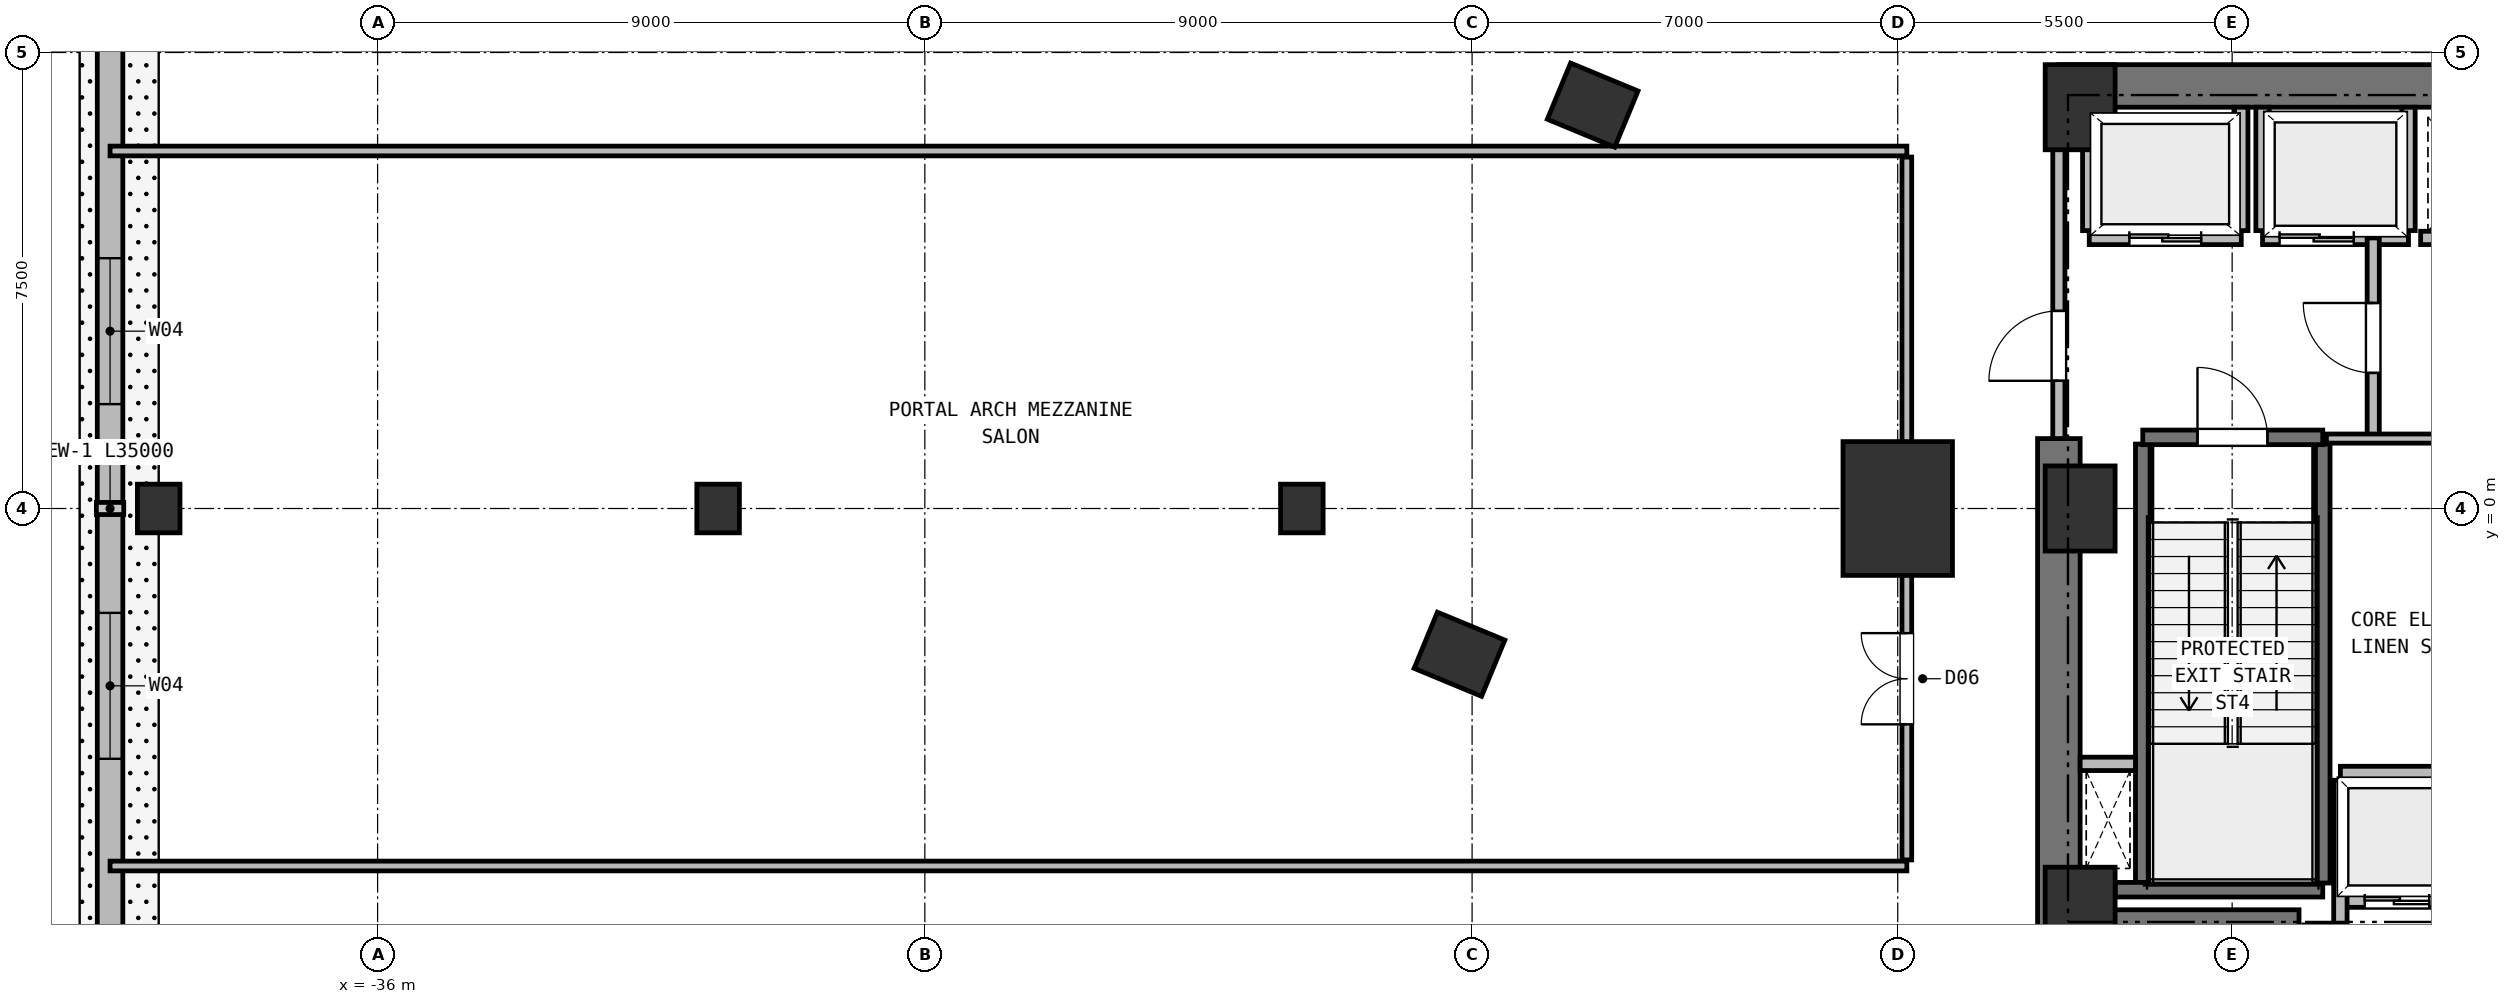
"""IFC4 building model, lengths in metres.
Left out: names, types, materials, properties, quantities, classifications, styles, units other than length and angle.
Written with IfcOpenShell. Run it as: python <this file> out.ifc"""

import sys

from ifc_helpers import new_model, si_unit, direction, frame, frame_2d, origin, origin_2d, place, context, subcontext, project, spatial, rectangle, extrude, element, fill, save


model = new_model("IFC4")
c1 = context("Model", 3, precision=1e-05, world=origin(), true_north=direction((0.0, 1.0)))
c2 = subcontext(c1, "Body", "Model", "MODEL_VIEW")
j1 = project(units=[si_unit("LENGTHUNIT", "METRE"), si_unit("PLANEANGLEUNIT", "RADIAN")], contexts=[c1])
p1 = place(None, origin())
s1 = spatial("IfcSite", under=j1, at=p1, CompositionType="ELEMENT")
p2 = place(p1, origin())
s2 = spatial("IfcBuilding", under=s1, at=p2, CompositionType="ELEMENT")
p3 = place(p2, frame((0.0, 0.0, 6.0)))
s3 = spatial("IfcBuildingStorey", under=s2, at=p3, CompositionType="ELEMENT", Elevation=6.0)
for number, where, z_axis, x_axis in (
    (1, (-8.0, -6.6, 0.0), (0.0, 0.0, 1.0), (1.0, 0.0, 0.0)),
    (2, (-8.0, 6.6, 0.0), (0.0, 0.0, 1.0), (1.0, 0.0, 0.0)),
    (3, (-8.0, 0.0, 0.0), (0.0, 0.0, 1.0), (1.0, 0.0, 0.0)),
):
    element("IfcColumn", number, at=place(p3, frame(where, z_axis=z_axis, x_axis=x_axis)), inside=s3, PredefinedType="COLUMN", context=c2, shape_type="SweptSolid", body=[
        extrude(rectangle(XDim=1.15, YDim=1.4, at=origin_2d()), origin(), (0.0, 0.0, 1.0), 5.0),
    ])
p4 = place(p3, frame((-8.35, 6.95, 0.0), z_axis=(0.0, 0.0, 1.0), x_axis=(1.0, 0.0, 0.0)))
e4 = element("IfcWall", 4, at=p4, inside=s3, PredefinedType="SHEAR", context=c2, shape_type="SweptSolid", body=[
    extrude(rectangle(XDim=16.7, YDim=0.7, at=frame_2d((8.35, 0.0))), origin(), (0.0, 0.0, 1.0), 4.72),
])
p5 = place(p3, frame((-8.35, -6.95, 0.0), z_axis=(0.0, 0.0, 1.0), x_axis=(1.0, 0.0, 0.0)))
e5 = element("IfcWall", 5, at=p5, inside=s3, PredefinedType="SHEAR", context=c2, shape_type="SweptSolid", body=[
    extrude(rectangle(XDim=3.95, YDim=0.7, at=frame_2d((1.975, 0.0))), origin(), (0.0, 0.0, 1.0), 4.72),
])
p6 = place(p3, frame((-8.35, -6.95, 0.0), z_axis=(0.0, 0.0, 1.0), x_axis=(0.0, 1.0, 0.0)))
e6 = element("IfcWall", 6, at=p6, inside=s3, PredefinedType="SHEAR", context=c2, shape_type="SweptSolid", body=[
    extrude(rectangle(XDim=8.1, YDim=0.7, at=frame_2d((4.05, 0.0))), origin(), (0.0, 0.0, 1.0), 4.72),
])
for number, where, z_axis, x_axis in (
    (7, (-16.017, 6.635, 0.0), (0.0, 0.0, 1.0), (0.383, 0.924, 0.0)),
    (8, (-18.207, -2.397, 0.0), (0.0, 0.0, 1.0), (0.383, 0.924, 0.0)),
):
    element("IfcColumn", number, at=place(p3, frame(where, z_axis=z_axis, x_axis=x_axis)), inside=s3, PredefinedType="COLUMN", context=c2, shape_type="SweptSolid", body=[
        extrude(rectangle(XDim=1.0, YDim=1.2, at=origin_2d()), origin(), (0.0, 0.0, 1.0), 5.0),
    ])
for number, where, z_axis, x_axis in (
    (9, (-39.6, 0.0, 0.0), (0.0, 0.0, 1.0), (1.0, 0.0, 0.0)),
    (10, (-30.4, 0.0, 0.0), (0.0, 0.0, 1.0), (1.0, 0.0, 0.0)),
    (11, (-20.8, 0.0, 0.0), (0.0, 0.0, 1.0), (1.0, 0.0, 0.0)),
):
    element("IfcColumn", number, at=place(p3, frame(where, z_axis=z_axis, x_axis=x_axis)), inside=s3, PredefinedType="COLUMN", context=c2, shape_type="SweptSolid", body=[
        extrude(rectangle(XDim=0.7, YDim=0.8, at=origin_2d()), origin(), (0.0, 0.0, 1.0), 5.0),
    ])
p7 = place(p3, frame((-11.0, 0.0, 0.0), z_axis=(0.0, 0.0, 1.0), x_axis=(1.0, 0.0, 0.0)))
e12 = element("IfcColumn", 12, at=p7, inside=s3, PredefinedType="COLUMN", context=c2, shape_type="SweptSolid", body=[
    extrude(rectangle(XDim=1.8, YDim=2.2, at=origin_2d()), origin(), (0.0, 0.0, 1.0), 5.0),
])
p8 = place(p3, frame((-40.4, -17.5, 0.0), z_axis=(0.0, 0.0, 1.0), x_axis=(0.0, 1.0, 0.0)))
e13 = element("IfcWall", 13, at=p8, inside=s3, PredefinedType="SOLIDWALL", context=c2, shape_type="SweptSolid", body=[
    extrude(rectangle(XDim=35.0, YDim=0.42, at=frame_2d((17.5, 0.0))), origin(), (0.0, 0.0, 1.0), 4.72),
])
p9 = place(p8, frame((1.717, 0.0, 0.95)))
e14 = element("IfcOpeningElement", 14, at=p9, cuts=e13, PredefinedType="OPENING", context=c2, shape_type="SweptSolid", body=[
    extrude(rectangle(XDim=2.4, YDim=2.6, at=frame_2d((1.2, 1.3))), frame((0.0, 0.22, 0.0), z_axis=(0.0, -1.0, 0.0), x_axis=(1.0, 0.0, 0.0)), (0.0, 0.0, 1.0), 0.44),
])
p10 = place(p8, frame((4.6, 0.0, 0.95)))
e15 = element("IfcOpeningElement", 15, at=p10, cuts=e13, PredefinedType="OPENING", context=c2, shape_type="SweptSolid", body=[
    extrude(rectangle(XDim=2.4, YDim=2.6, at=frame_2d((1.2, 1.3))), frame((0.0, 0.22, 0.0), z_axis=(0.0, -1.0, 0.0), x_axis=(1.0, 0.0, 0.0)), (0.0, 0.0, 1.0), 0.44),
])
p11 = place(p8, frame((13.383, 0.0, 0.95)))
e16 = element("IfcOpeningElement", 16, at=p11, cuts=e13, PredefinedType="OPENING", context=c2, shape_type="SweptSolid", body=[
    extrude(rectangle(XDim=2.4, YDim=2.6, at=frame_2d((1.2, 1.3))), frame((0.0, 0.22, 0.0), z_axis=(0.0, -1.0, 0.0), x_axis=(1.0, 0.0, 0.0)), (0.0, 0.0, 1.0), 0.44),
])
p12 = place(p8, frame((19.217, 0.0, 0.95)))
e17 = element("IfcOpeningElement", 17, at=p12, cuts=e13, PredefinedType="OPENING", context=c2, shape_type="SweptSolid", body=[
    extrude(rectangle(XDim=2.4, YDim=2.6, at=frame_2d((1.2, 1.3))), frame((0.0, 0.22, 0.0), z_axis=(0.0, -1.0, 0.0), x_axis=(1.0, 0.0, 0.0)), (0.0, 0.0, 1.0), 0.44),
])
p13 = place(p8, frame((28.0, 0.0, 0.95)))
e18 = element("IfcOpeningElement", 18, at=p13, cuts=e13, PredefinedType="OPENING", context=c2, shape_type="SweptSolid", body=[
    extrude(rectangle(XDim=2.4, YDim=2.6, at=frame_2d((1.2, 1.3))), frame((0.0, 0.22, 0.0), z_axis=(0.0, -1.0, 0.0), x_axis=(1.0, 0.0, 0.0)), (0.0, 0.0, 1.0), 0.44),
])
p14 = place(p8, frame((30.883, 0.0, 0.95)))
e19 = element("IfcOpeningElement", 19, at=p14, cuts=e13, PredefinedType="OPENING", context=c2, shape_type="SweptSolid", body=[
    extrude(rectangle(XDim=2.4, YDim=2.6, at=frame_2d((1.2, 1.3))), frame((0.0, 0.22, 0.0), z_axis=(0.0, -1.0, 0.0), x_axis=(1.0, 0.0, 0.0)), (0.0, 0.0, 1.0), 0.44),
])
p15 = place(p3, frame((-6.97, -6.16, 0.0), z_axis=(0.0, 0.0, 1.0), x_axis=(0.0, 1.0, 0.0)))
e20 = element("IfcWall", 20, at=p15, inside=s3, PredefinedType="SHEAR", context=c2, shape_type="SweptSolid", body=[
    extrude(rectangle(XDim=7.22, YDim=0.24, at=frame_2d((3.61, 0.0))), origin(), (0.0, 0.0, 1.0), 4.72),
])
p16 = place(p3, frame((-7.425, -6.27, 0.0), z_axis=(0.0, 0.0, 1.0), x_axis=(1.0, 0.0, 0.0)))
e21 = element("IfcWall", 21, at=p16, inside=s3, PredefinedType="SHEAR", context=c2, shape_type="SweptSolid", body=[
    extrude(rectangle(XDim=3.415, YDim=0.24, at=frame_2d((1.708, 0.0))), origin(), (0.0, 0.0, 1.0), 4.72),
])
p17 = place(p3, frame((-4.01, -6.16, 0.0), z_axis=(0.0, 0.0, 1.0), x_axis=(0.0, 1.0, 0.0)))
e22 = element("IfcWall", 22, at=p17, inside=s3, PredefinedType="SHEAR", context=c2, shape_type="SweptSolid", body=[
    extrude(rectangle(XDim=7.22, YDim=0.24, at=frame_2d((3.61, 0.0))), origin(), (0.0, 0.0, 1.0), 4.72),
])
p18 = place(p3, frame((-6.97, 1.17, 0.0), z_axis=(0.0, 0.0, 1.0), x_axis=(1.0, 0.0, 0.0)))
e23 = element("IfcWall", 23, at=p18, inside=s3, PredefinedType="SHEAR", context=c2, shape_type="SweptSolid", body=[
    extrude(rectangle(XDim=2.96, YDim=0.24, at=frame_2d((1.48, 0.0))), origin(), (0.0, 0.0, 1.0), 4.72),
])
p19 = place(p18, frame((0.9, 0.0, 0.0)))
e24 = element("IfcOpeningElement", 24, at=p19, cuts=e23, PredefinedType="OPENING", context=c2, shape_type="SweptSolid", body=[
    extrude(rectangle(XDim=1.15, YDim=2.15, at=frame_2d((0.575, 1.075))), frame((0.0, 0.13, 0.0), z_axis=(0.0, -1.0, 0.0), x_axis=(1.0, 0.0, 0.0)), (0.0, 0.0, 1.0), 0.26),
])
p20 = place(p3, frame((-8.0, -4.2, 0.0), z_axis=(0.0, 0.0, 1.0), x_axis=(1.0, 0.0, 0.0)))
e25 = element("IfcWall", 25, at=p20, inside=s3, PredefinedType="PARTITIONING", context=c2, shape_type="SweptSolid", body=[
    extrude(rectangle(XDim=0.91, YDim=0.22, at=frame_2d((0.455, 0.0))), origin(), (0.0, 0.0, 1.0), 4.72),
])
p21 = place(p3, frame((-7.85, 4.45, 0.0), z_axis=(0.0, 0.0, 1.0), x_axis=(1.0, 0.0, 0.0)))
e26 = element("IfcWall", 26, at=p21, inside=s3, PredefinedType="PARTITIONING", context=c2, shape_type="SweptSolid", body=[
    extrude(rectangle(XDim=2.5, YDim=0.22, at=frame_2d((1.25, 0.0))), origin(), (0.0, 0.0, 1.0), 4.72),
])
p22 = place(p21, frame((0.66, 0.0, 0.0)))
e27 = element("IfcOpeningElement", 27, at=p22, cuts=e26, PredefinedType="OPENING", context=c2, shape_type="SweptSolid", body=[
    extrude(rectangle(XDim=1.18, YDim=2.15, at=frame_2d((0.59, 1.075))), frame((0.0, 0.12, 0.0), z_axis=(0.0, -1.0, 0.0), x_axis=(1.0, 0.0, 0.0)), (0.0, 0.0, 1.0), 0.24),
])
p23 = place(p3, frame((-7.85, 4.57, 0.0), z_axis=(0.0, 0.0, 1.0), x_axis=(0.0, 1.0, 0.0)))
e28 = element("IfcWall", 28, at=p23, inside=s3, PredefinedType="PARTITIONING", context=c2, shape_type="SweptSolid", body=[
    extrude(rectangle(XDim=2.03, YDim=0.22, at=frame_2d((1.015, 0.0))), origin(), (0.0, 0.0, 1.0), 4.3),
])
p24 = place(p3, frame((-5.35, 4.57, 0.0), z_axis=(0.0, 0.0, 1.0), x_axis=(0.0, 1.0, 0.0)))
e29 = element("IfcWall", 29, at=p24, inside=s3, PredefinedType="PARTITIONING", context=c2, shape_type="SweptSolid", body=[
    extrude(rectangle(XDim=2.03, YDim=0.22, at=frame_2d((1.015, 0.0))), origin(), (0.0, 0.0, 1.0), 4.72),
])
p25 = place(p3, frame((-5.0, 4.45, 0.0), z_axis=(0.0, 0.0, 1.0), x_axis=(1.0, 0.0, 0.0)))
e30 = element("IfcWall", 30, at=p25, inside=s3, PredefinedType="PARTITIONING", context=c2, shape_type="SweptSolid", body=[
    extrude(rectangle(XDim=2.4, YDim=0.22, at=frame_2d((1.2, 0.0))), origin(), (0.0, 0.0, 1.0), 4.72),
])
p26 = place(p25, frame((0.28, 0.0, 0.0)))
e31 = element("IfcOpeningElement", 31, at=p26, cuts=e30, PredefinedType="OPENING", context=c2, shape_type="SweptSolid", body=[
    extrude(rectangle(XDim=1.22, YDim=2.15, at=frame_2d((0.61, 1.075))), frame((0.0, 0.12, 0.0), z_axis=(0.0, -1.0, 0.0), x_axis=(1.0, 0.0, 0.0)), (0.0, 0.0, 1.0), 0.24),
])
for number, where, z_axis, x_axis in (
    (32, (-5.0, 4.57, 0.0), (0.0, 0.0, 1.0), (0.0, 1.0, 0.0)),
    (33, (-2.6, 4.57, 0.0), (0.0, 0.0, 1.0), (0.0, 1.0, 0.0)),
):
    element("IfcWall", number, at=place(p3, frame(where, z_axis=z_axis, x_axis=x_axis)), inside=s3, PredefinedType="PARTITIONING", context=c2, shape_type="SweptSolid", body=[
        extrude(rectangle(XDim=2.03, YDim=0.22, at=frame_2d((1.015, 0.0))), origin(), (0.0, 0.0, 1.0), 4.72),
    ])
p27 = place(p3, frame((-3.72, -6.45, 0.0), z_axis=(0.0, 0.0, 1.0), x_axis=(1.0, 0.0, 0.0)))
e34 = element("IfcWall", 34, at=p27, inside=s3, PredefinedType="PARTITIONING", context=c2, shape_type="SweptSolid", body=[
    extrude(rectangle(XDim=1.86, YDim=0.22, at=frame_2d((0.93, 0.0))), origin(), (0.0, 0.0, 1.0), 4.3),
])
p28 = place(p27, frame((0.4, 0.0, 0.0)))
e35 = element("IfcOpeningElement", 35, at=p28, cuts=e34, PredefinedType="OPENING", context=c2, shape_type="SweptSolid", body=[
    extrude(rectangle(XDim=1.06, YDim=2.15, at=frame_2d((0.53, 1.075))), frame((0.0, 0.12, 0.0), z_axis=(0.0, -1.0, 0.0), x_axis=(1.0, 0.0, 0.0)), (0.0, 0.0, 1.0), 0.24),
])
p29 = place(p3, frame((-3.72, -4.35, 0.0), z_axis=(0.0, 0.0, 1.0), x_axis=(1.0, 0.0, 0.0)))
e36 = element("IfcWall", 36, at=p29, inside=s3, PredefinedType="PARTITIONING", context=c2, shape_type="SweptSolid", body=[
    extrude(rectangle(XDim=1.86, YDim=0.22, at=frame_2d((0.93, 0.0))), origin(), (0.0, 0.0, 1.0), 4.72),
])
p30 = place(p3, frame((-3.72, -6.83, 0.0), z_axis=(0.0, 0.0, 1.0), x_axis=(0.0, 1.0, 0.0)))
e37 = element("IfcWall", 37, at=p30, inside=s3, PredefinedType="PARTITIONING", context=c2, shape_type="SweptSolid", body=[
    extrude(rectangle(XDim=2.36, YDim=0.22, at=frame_2d((1.18, 0.0))), origin(), (0.0, 0.0, 1.0), 4.72),
])
p31 = place(p3, frame((-2.4, 4.45, 0.0), z_axis=(0.0, 0.0, 1.0), x_axis=(1.0, 0.0, 0.0)))
e38 = element("IfcWall", 38, at=p31, inside=s3, PredefinedType="PARTITIONING", context=c2, shape_type="SweptSolid", body=[
    extrude(rectangle(XDim=2.2, YDim=0.22, at=frame_2d((1.1, 0.0))), origin(), (0.0, 0.0, 1.0), 4.72),
])
p32 = place(p3, frame((-3.18, 1.15, 0.0), z_axis=(0.0, 0.0, 1.0), x_axis=(0.0, 1.0, 0.0)))
e39 = element("IfcWall", 39, at=p32, inside=s3, PredefinedType="PARTITIONING", context=c2, shape_type="SweptSolid", body=[
    extrude(rectangle(XDim=3.3, YDim=0.2, at=frame_2d((1.65, 0.0))), origin(), (0.0, 0.0, 1.0), 4.72),
])
p33 = place(p32, frame((1.08, 0.0, 0.0)))
e40 = element("IfcOpeningElement", 40, at=p33, cuts=e39, PredefinedType="OPENING", context=c2, shape_type="SweptSolid", body=[
    extrude(rectangle(XDim=1.15, YDim=2.15, at=frame_2d((0.575, 1.075))), frame((0.0, 0.11, 0.0), z_axis=(0.0, -1.0, 0.0), x_axis=(1.0, 0.0, 0.0)), (0.0, 0.0, 1.0), 0.22),
])
p34 = place(p3, frame((-8.35, 1.15, 0.0), z_axis=(0.0, 0.0, 1.0), x_axis=(0.0, 1.0, 0.0)))
e41 = element("IfcWall", 41, at=p34, inside=s3, PredefinedType="PARTITIONING", context=c2, shape_type="SweptSolid", body=[
    extrude(rectangle(XDim=5.4, YDim=0.2, at=frame_2d((2.7, 0.0))), origin(), (0.0, 0.0, 1.0), 4.72),
])
p35 = place(p34, frame((0.95, 0.0, 0.0)))
e42 = element("IfcOpeningElement", 42, at=p35, cuts=e41, PredefinedType="OPENING", context=c2, shape_type="SweptSolid", body=[
    extrude(rectangle(XDim=1.15, YDim=2.15, at=frame_2d((0.575, 1.075))), frame((0.0, 0.11, 0.0), z_axis=(0.0, -1.0, 0.0), x_axis=(1.0, 0.0, 0.0)), (0.0, 0.0, 1.0), 0.22),
])
p36 = place(p3, frame((3.95, 1.15, 0.0), z_axis=(0.0, 0.0, 1.0), x_axis=(-1.0, 0.0, 0.0)))
e43 = element("IfcWall", 43, at=p36, inside=s3, PredefinedType="PARTITIONING", context=c2, shape_type="SweptSolid", body=[
    extrude(rectangle(XDim=7.9, YDim=0.15, at=frame_2d((3.95, 0.0))), origin(), (0.0, 0.0, 1.0), 4.72),
])
p37 = place(p36, frame((3.49, 0.0, 0.0)))
e44 = element("IfcOpeningElement", 44, at=p37, cuts=e43, PredefinedType="OPENING", context=c2, shape_type="SweptSolid", body=[
    extrude(rectangle(XDim=0.92, YDim=2.05, at=frame_2d((0.46, 1.025))), frame((0.0, 0.085, 0.0), z_axis=(0.0, -1.0, 0.0), x_axis=(1.0, 0.0, 0.0)), (0.0, 0.0, 1.0), 0.17),
])
for number, where, z_axis, x_axis in (
    (45, (-10.85, 5.88, 0.0), (0.0, 0.0, 1.0), (-1.0, 0.0, 0.0)),
    (46, (-40.4, -5.88, 0.0), (0.0, 0.0, 1.0), (1.0, 0.0, 0.0)),
):
    element("IfcWall", number, at=place(p3, frame(where, z_axis=z_axis, x_axis=x_axis)), inside=s3, PredefinedType="PARTITIONING", context=c2, shape_type="SweptSolid", body=[
        extrude(rectangle(XDim=29.55, YDim=0.16, at=frame_2d((14.775, 0.0))), origin(), (0.0, 0.0, 1.0), 4.72),
    ])
p38 = place(p3, frame((-10.85, -5.78, 0.0), z_axis=(0.0, 0.0, 1.0), x_axis=(0.0, 1.0, 0.0)))
e47 = element("IfcWall", 47, at=p38, inside=s3, PredefinedType="PARTITIONING", context=c2, shape_type="SweptSolid", body=[
    extrude(rectangle(XDim=11.56, YDim=0.16, at=frame_2d((5.78, 0.0))), origin(), (0.0, 0.0, 1.0), 4.1),
])
p39 = place(p38, frame((2.23, 0.0, 0.0)))
e48 = element("IfcOpeningElement", 48, at=p39, cuts=e47, PredefinedType="OPENING", context=c2, shape_type="SweptSolid", body=[
    extrude(rectangle(XDim=1.5, YDim=2.2, at=frame_2d((0.75, 1.1))), frame((0.0, 0.09, 0.0), z_axis=(0.0, -1.0, 0.0), x_axis=(1.0, 0.0, 0.0)), (0.0, 0.0, 1.0), 0.18),
])
p40 = place(p11, origin())
e49 = element("IfcWindow", 49, at=p40, inside=s3, PartitioningType="SINGLE_PANEL", PredefinedType="WINDOW", context=c2, shape_type="SweptSolid", body=[
    extrude(rectangle(XDim=2.4, YDim=2.6, at=frame_2d((1.2, 1.3))), frame((0.0, 0.03, 0.0), z_axis=(0.0, -1.0, 0.0), x_axis=(1.0, 0.0, 0.0)), (0.0, 0.0, 1.0), 0.06),
])
fill(e16, e49)
p41 = place(p12, origin())
e50 = element("IfcWindow", 50, at=p41, inside=s3, PartitioningType="SINGLE_PANEL", PredefinedType="WINDOW", context=c2, shape_type="SweptSolid", body=[
    extrude(rectangle(XDim=2.4, YDim=2.6, at=frame_2d((1.2, 1.3))), frame((0.0, 0.03, 0.0), z_axis=(0.0, -1.0, 0.0), x_axis=(1.0, 0.0, 0.0)), (0.0, 0.0, 1.0), 0.06),
])
fill(e17, e50)
p42 = place(p19, origin())
e51 = element("IfcDoor", 51, at=p42, inside=s3, OperationType="SINGLE_SWING_LEFT", PredefinedType="DOOR", context=c2, shape_type="SweptSolid", body=[
    extrude(rectangle(XDim=1.15, YDim=2.15, at=frame_2d((0.575, 1.075))), frame((0.0, 0.025, 0.0), z_axis=(0.0, -1.0, 0.0), x_axis=(1.0, 0.0, 0.0)), (0.0, 0.0, 1.0), 0.05),
])
fill(e24, e51)
p43 = place(p22, origin())
e52 = element("IfcDoor", 52, at=p43, inside=s3, OperationType="DOUBLE_DOOR_SLIDING", PredefinedType="DOOR", context=c2, shape_type="SweptSolid", body=[
    extrude(rectangle(XDim=1.18, YDim=2.15, at=frame_2d((0.59, 1.075))), frame((0.0, 0.025, 0.0), z_axis=(0.0, -1.0, 0.0), x_axis=(1.0, 0.0, 0.0)), (0.0, 0.0, 1.0), 0.05),
])
fill(e27, e52)
p44 = place(p26, origin())
e53 = element("IfcDoor", 53, at=p44, inside=s3, OperationType="DOUBLE_DOOR_SLIDING", PredefinedType="DOOR", context=c2, shape_type="SweptSolid", body=[
    extrude(rectangle(XDim=1.22, YDim=2.15, at=frame_2d((0.61, 1.075))), frame((0.0, 0.025, 0.0), z_axis=(0.0, -1.0, 0.0), x_axis=(1.0, 0.0, 0.0)), (0.0, 0.0, 1.0), 0.05),
])
fill(e31, e53)
p45 = place(p28, origin())
e54 = element("IfcDoor", 54, at=p45, inside=s3, OperationType="DOUBLE_DOOR_SLIDING", PredefinedType="DOOR", context=c2, shape_type="SweptSolid", body=[
    extrude(rectangle(XDim=1.06, YDim=2.15, at=frame_2d((0.53, 1.075))), frame((0.0, 0.025, 0.0), z_axis=(0.0, -1.0, 0.0), x_axis=(1.0, 0.0, 0.0)), (0.0, 0.0, 1.0), 0.05),
])
fill(e35, e54)
p46 = place(p33, origin())
e55 = element("IfcDoor", 55, at=p46, inside=s3, OperationType="SINGLE_SWING_RIGHT", PredefinedType="DOOR", context=c2, shape_type="SweptSolid", body=[
    extrude(rectangle(XDim=1.15, YDim=2.15, at=frame_2d((0.575, 1.075))), frame((0.0, 0.025, 0.0), z_axis=(0.0, -1.0, 0.0), x_axis=(1.0, 0.0, 0.0)), (0.0, 0.0, 1.0), 0.05),
])
fill(e40, e55)
p47 = place(p35, origin())
e56 = element("IfcDoor", 56, at=p47, inside=s3, OperationType="SINGLE_SWING_LEFT", PredefinedType="DOOR", context=c2, shape_type="SweptSolid", body=[
    extrude(rectangle(XDim=1.15, YDim=2.15, at=frame_2d((0.575, 1.075))), frame((0.0, 0.025, 0.0), z_axis=(0.0, -1.0, 0.0), x_axis=(1.0, 0.0, 0.0)), (0.0, 0.0, 1.0), 0.05),
])
fill(e42, e56)
p48 = place(p39, origin())
e57 = element("IfcDoor", 57, at=p48, inside=s3, OperationType="DOUBLE_DOOR_SINGLE_SWING", PredefinedType="DOOR", context=c2, shape_type="SweptSolid", body=[
    extrude(rectangle(XDim=1.5, YDim=2.2, at=frame_2d((0.75, 1.1))), frame((0.0, 0.025, 0.0), z_axis=(0.0, -1.0, 0.0), x_axis=(1.0, 0.0, 0.0)), (0.0, 0.0, 1.0), 0.05),
])
fill(e48, e57)
save(model, sys.argv[1])
